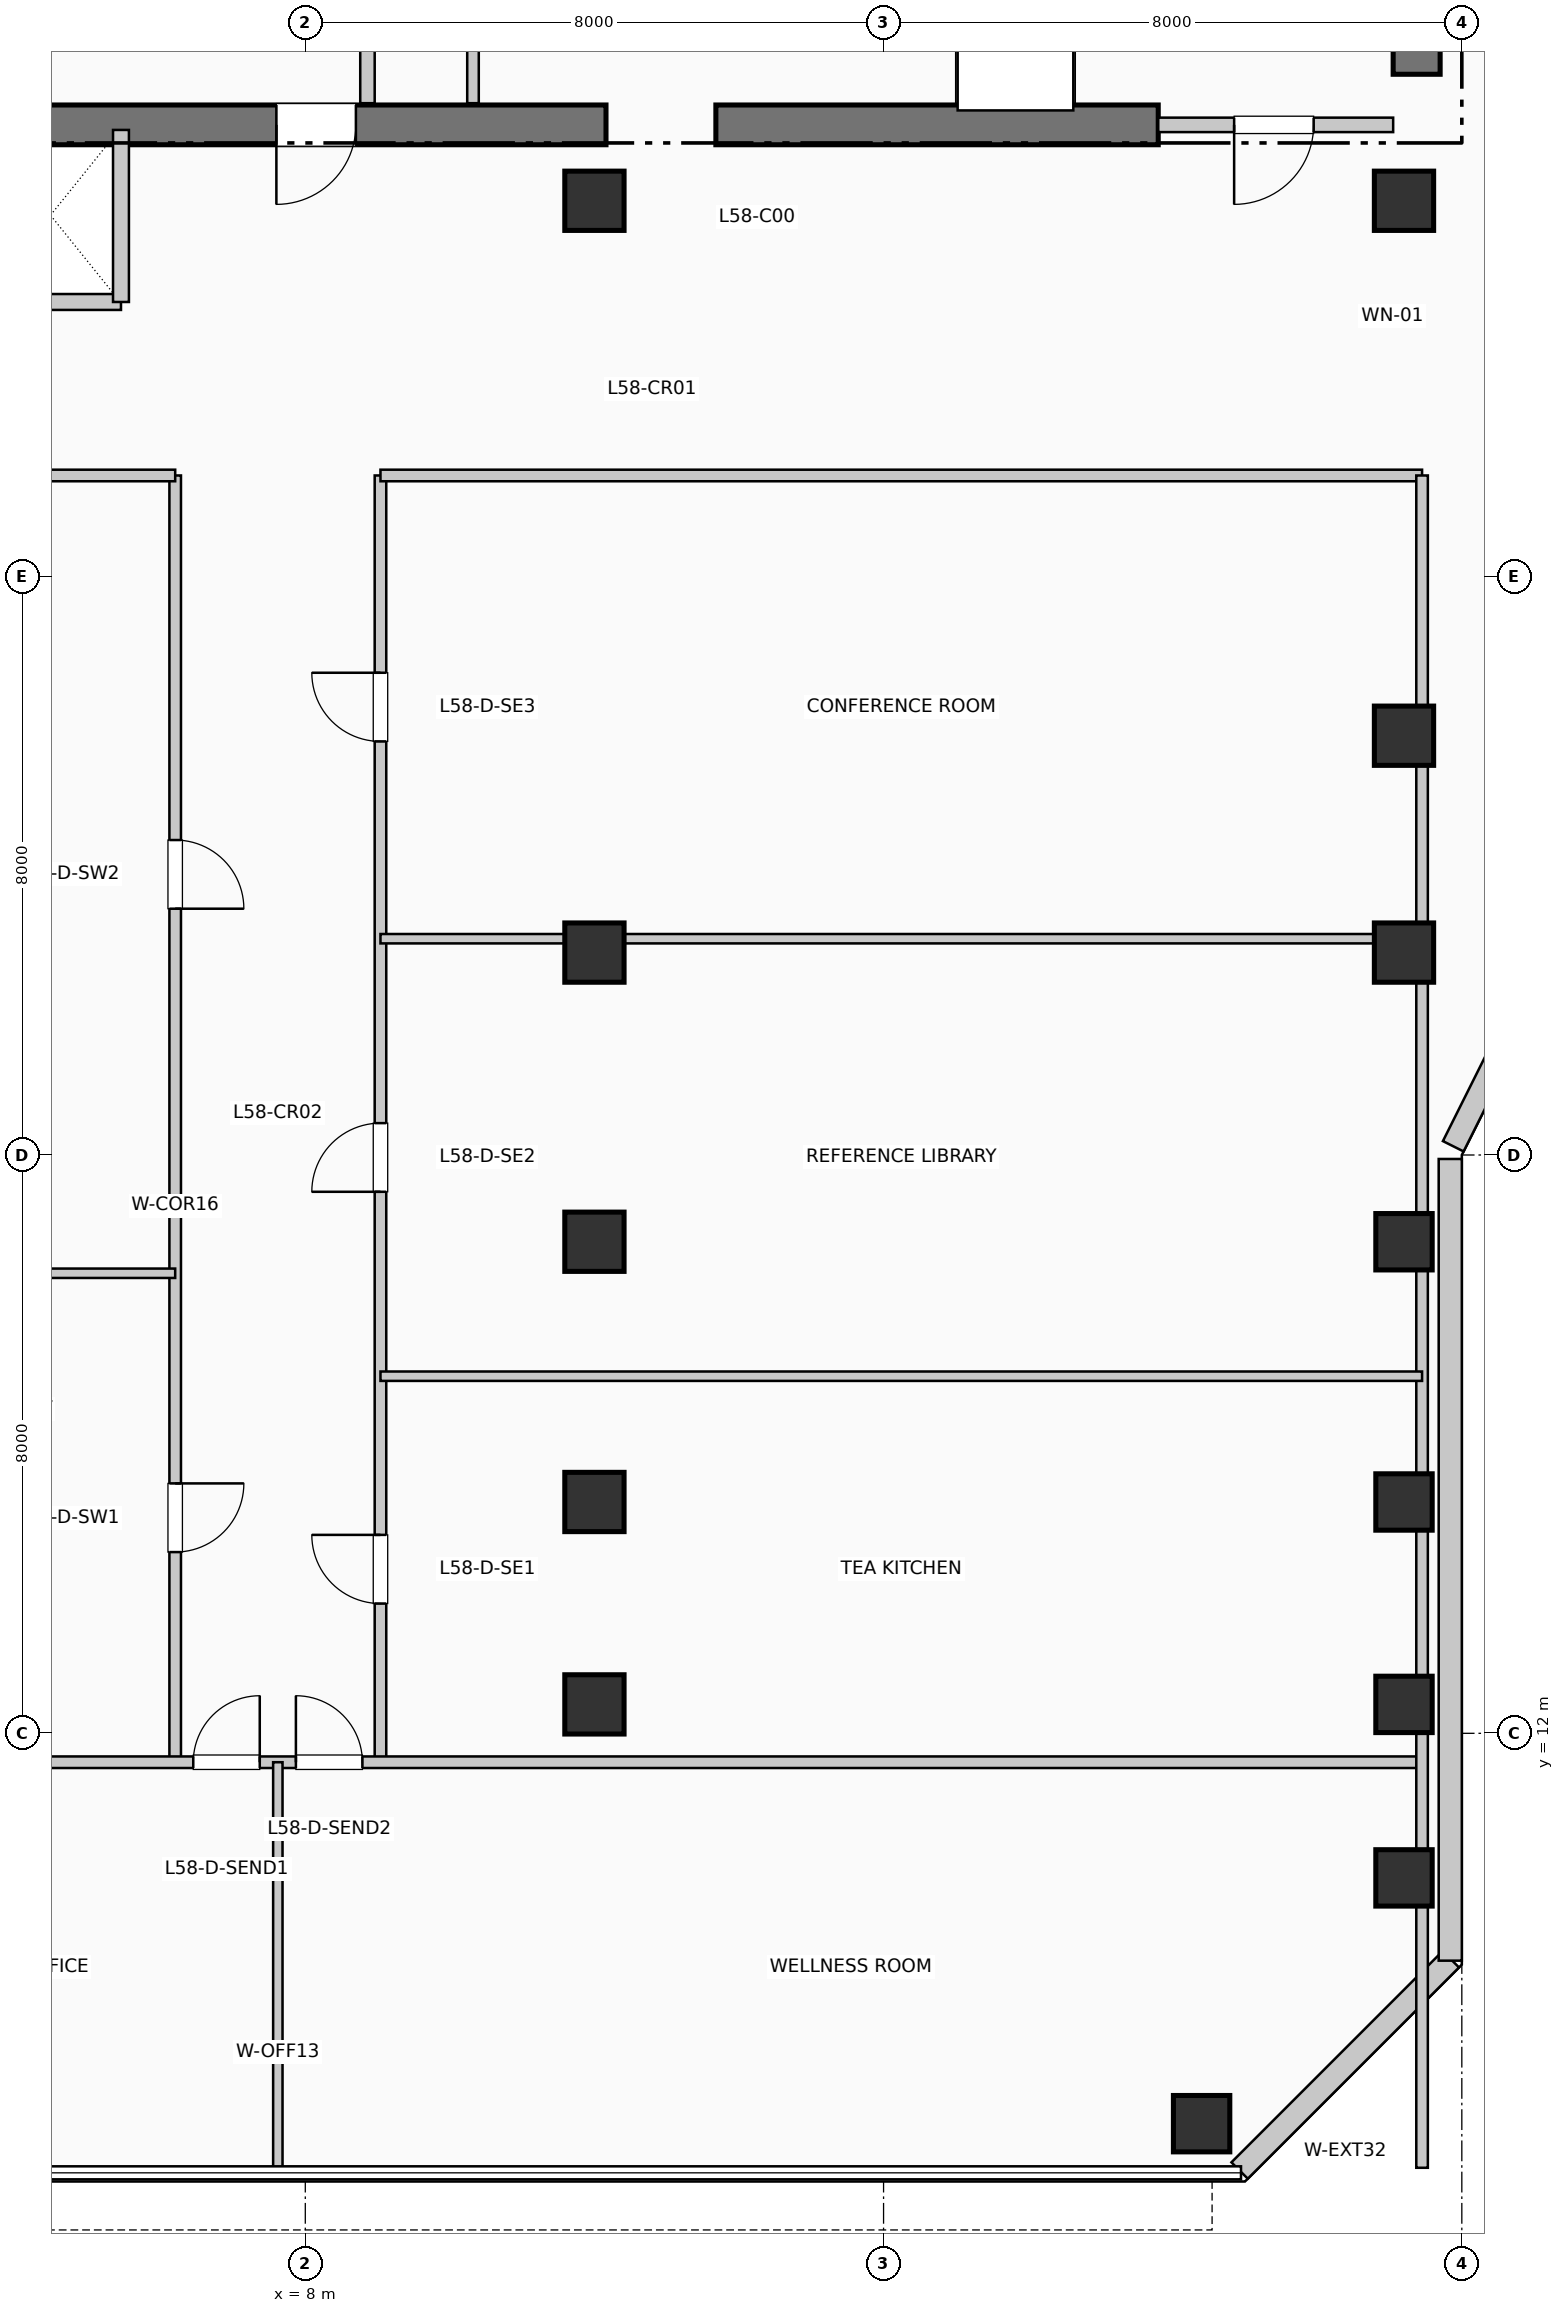
"""IFC4 building model, lengths in metres.
Left out: names, types, materials, properties, quantities, classifications, styles, units other than length and angle.
Written with IfcOpenShell. Run it as: python <this file> out.ifc"""

import sys

from ifc_helpers import new_model, si_unit, direction, frame, frame_2d, origin, origin_2d, place, context, subcontext, project, spatial, rectangle, extrude, element, fill, save


model = new_model("IFC4")
c1 = context("Model", 3, precision=1e-05, world=origin(), true_north=direction((0.0, 1.0)))
c2 = subcontext(c1, "Body", "Model", "MODEL_VIEW")
j1 = project(units=[si_unit("LENGTHUNIT", "METRE"), si_unit("PLANEANGLEUNIT", "RADIAN")], contexts=[c1])
p1 = place(None, origin())
s1 = spatial("IfcSite", under=j1, at=p1, CompositionType="ELEMENT")
p2 = place(p1, origin())
s2 = spatial("IfcBuilding", under=s1, at=p2, CompositionType="ELEMENT")
p3 = place(p2, frame((0.0, 0.0, 239.58)))
s3 = spatial("IfcBuildingStorey", under=s2, at=p3, CompositionType="ELEMENT", Elevation=239.58)
p4 = place(p3, frame((23.375, 34.95, 0.0), z_axis=(0.0, 0.0, 1.0), x_axis=(0.0, 1.0, 0.0)))
e1 = element("IfcWall", 1, at=p4, inside=s3, PredefinedType="SHEAR", context=c2, shape_type="SweptSolid", body=[
    extrude(rectangle(XDim=10.64, YDim=0.65, at=frame_2d((5.32, 0.0))), origin(), (0.0, 0.0, 1.0), 3.96),
])
p5 = place(p3, frame((1.45, 34.25, 0.0), z_axis=(0.0, 0.0, 1.0), x_axis=(1.0, 0.0, 0.0)))
e2 = element("IfcWall", 2, at=p5, inside=s3, PredefinedType="SHEAR", context=c2, shape_type="SweptSolid", body=[
    extrude(rectangle(XDim=10.71, YDim=0.55, at=frame_2d((5.355, 0.0))), origin(), (0.0, 0.0, 1.0), 3.96),
])
p6 = place(p5, frame((7.25, 0.0, 0.0), z_axis=(0.0, 0.0, 1.0), x_axis=(-1.0, 0.0, 0.0)))
e3 = element("IfcOpeningElement", 3, at=p6, cuts=e2, PredefinedType="OPENING", context=c2, shape_type="SweptSolid", body=[
    extrude(rectangle(XDim=1.1, YDim=2.15, at=frame_2d((0.55, 1.075))), frame((0.0, 0.285, 0.0), z_axis=(0.0, -1.0, 0.0), x_axis=(1.0, 0.0, 0.0)), (0.0, 0.0, 1.0), 0.57),
])
p7 = place(p3, frame((13.68, 34.25, 0.0), z_axis=(0.0, 0.0, 1.0), x_axis=(1.0, 0.0, 0.0)))
e4 = element("IfcWall", 4, at=p7, inside=s3, PredefinedType="SHEAR", context=c2, shape_type="SweptSolid", body=[
    extrude(rectangle(XDim=6.12, YDim=0.55, at=frame_2d((3.06, 0.0))), origin(), (0.0, 0.0, 1.0), 3.96),
])
for number, where, z_axis, x_axis in (
    (5, (12.0, 12.4, 0.0), (0.0, 0.0, 1.0), (1.0, 0.0, 0.0)),
    (6, (12.0, 15.2, 0.0), (0.0, 0.0, 1.0), (1.0, 0.0, 0.0)),
    (7, (12.0, 18.8, 0.0), (0.0, 0.0, 1.0), (1.0, 0.0, 0.0)),
    (8, (12.0, 22.8, 0.0), (0.0, 0.0, 1.0), (1.0, 0.0, 0.0)),
    (9, (12.0, 33.2, 0.0), (0.0, 0.0, 1.0), (1.0, 0.0, 0.0)),
):
    element("IfcColumn", number, at=place(p3, frame(where, z_axis=z_axis, x_axis=x_axis)), inside=s3, PredefinedType="COLUMN", context=c2, shape_type="SweptSolid", body=[
        extrude(rectangle(XDim=0.82, YDim=0.82, at=origin_2d()), origin(), (0.0, 0.0, 1.0), 3.96),
    ])
for number, where, z_axis, x_axis in (
    (10, (20.4, 6.6, 0.0), (0.0, 0.0, 1.0), (1.0, 0.0, 0.0)),
    (11, (23.2, 10.0, 0.0), (0.0, 0.0, 1.0), (1.0, 0.0, 0.0)),
    (12, (23.2, 12.4, 0.0), (0.0, 0.0, 1.0), (1.0, 0.0, 0.0)),
    (13, (23.2, 15.2, 0.0), (0.0, 0.0, 1.0), (1.0, 0.0, 0.0)),
    (14, (23.2, 18.8, 0.0), (0.0, 0.0, 1.0), (1.0, 0.0, 0.0)),
):
    element("IfcColumn", number, at=place(p3, frame(where, z_axis=z_axis, x_axis=x_axis)), inside=s3, PredefinedType="COLUMN", context=c2, shape_type="SweptSolid", body=[
        extrude(rectangle(XDim=0.78, YDim=0.78, at=origin_2d()), origin(), (0.0, 0.0, 1.0), 3.96),
    ])
for number, where, z_axis, x_axis in (
    (15, (23.2, 22.8, 0.0), (0.0, 0.0, 1.0), (1.0, 0.0, 0.0)),
    (16, (23.2, 25.8, 0.0), (0.0, 0.0, 1.0), (1.0, 0.0, 0.0)),
    (17, (23.2, 33.2, 0.0), (0.0, 0.0, 1.0), (1.0, 0.0, 0.0)),
):
    element("IfcColumn", number, at=place(p3, frame(where, z_axis=z_axis, x_axis=x_axis)), inside=s3, PredefinedType="COLUMN", context=c2, shape_type="SweptSolid", body=[
        extrude(rectangle(XDim=0.82, YDim=0.82, at=origin_2d()), origin(), (0.0, 0.0, 1.0), 3.96),
    ])
p8 = place(p3, frame((20.926, 5.952, 0.0), z_axis=(0.0, 0.0, 1.0), x_axis=(0.707077242712, 0.707136318428, 0.0)))
e18 = element("IfcWall", 18, at=p8, inside=s3, PredefinedType="SOLIDWALL", context=c2, shape_type="SweptSolid", body=[
    extrude(rectangle(XDim=4.133, YDim=0.32, at=frame_2d((2.066, 0.0))), origin(), (0.0, 0.0, 1.0), 3.71),
])
p9 = place(p3, frame((23.84, 8.855, 0.0), z_axis=(0.0, 0.0, 1.0), x_axis=(0.0, 1.0, 0.0)))
e19 = element("IfcWall", 19, at=p9, inside=s3, PredefinedType="SOLIDWALL", context=c2, shape_type="SweptSolid", body=[
    extrude(rectangle(XDim=11.09, YDim=0.32, at=frame_2d((5.545, 0.0))), origin(), (0.0, 0.0, 1.0), 3.71),
])
p10 = place(p3, frame((23.882, 20.121, 0.0), z_axis=(0.0, 0.0, 1.0), x_axis=(0.447121734542, 0.894473115583, 0.0)))
e20 = element("IfcWall", 20, at=p10, inside=s3, PredefinedType="SOLIDWALL", context=c2, shape_type="SweptSolid", body=[
    extrude(rectangle(XDim=2.126, YDim=0.32, at=frame_2d((1.063, 0.0))), origin(), (0.0, 0.0, 1.0), 3.71),
])
p11 = place(p3, frame((8.86, 34.55, 0.0), z_axis=(0.0, 0.0, 1.0), x_axis=(0.0, 1.0, 0.0)))
e21 = element("IfcWall", 21, at=p11, inside=s3, PredefinedType="PARTITIONING", context=c2, shape_type="SweptSolid", body=[
    extrude(rectangle(XDim=2.5, YDim=0.2, at=frame_2d((1.25, 0.0))), origin(), (0.0, 0.0, 1.0), 3.71),
])
p12 = place(p3, frame((19.8, 34.25, 0.0), z_axis=(0.0, 0.0, 1.0), x_axis=(1.0, 0.0, 0.0)))
e22 = element("IfcWall", 22, at=p12, inside=s3, PredefinedType="PARTITIONING", context=c2, shape_type="SweptSolid", body=[
    extrude(rectangle(XDim=3.25, YDim=0.2, at=frame_2d((1.625, 0.0))), origin(), (0.0, 0.0, 1.0), 3.71),
])
p13 = place(p12, frame((2.15, 0.0, 0.0), z_axis=(0.0, 0.0, 1.0), x_axis=(-1.0, 0.0, 0.0)))
e23 = element("IfcOpeningElement", 23, at=p13, cuts=e22, PredefinedType="OPENING", context=c2, shape_type="SweptSolid", body=[
    extrude(rectangle(XDim=1.1, YDim=2.15, at=frame_2d((0.55, 1.075))), frame((0.0, 0.11, 0.0), z_axis=(0.0, -1.0, 0.0), x_axis=(1.0, 0.0, 0.0)), (0.0, 0.0, 1.0), 0.22),
])
p14 = place(p3, frame((1.55, 31.8, 0.0), z_axis=(0.0, 0.0, 1.0), x_axis=(1.0, 0.0, 0.0)))
e24 = element("IfcWall", 24, at=p14, inside=s3, PredefinedType="PARTITIONING", context=c2, shape_type="SweptSolid", body=[
    extrude(rectangle(XDim=3.9, YDim=0.22, at=frame_2d((1.95, 0.0))), origin(), (0.0, 0.0, 1.0), 3.71),
])
p15 = place(p3, frame((5.45, 31.8, 0.0), z_axis=(0.0, 0.0, 1.0), x_axis=(0.0, 1.0, 0.0)))
e25 = element("IfcWall", 25, at=p15, inside=s3, PredefinedType="PARTITIONING", context=c2, shape_type="SweptSolid", body=[
    extrude(rectangle(XDim=2.38, YDim=0.22, at=frame_2d((1.19, 0.0))), origin(), (0.0, 0.0, 1.0), 3.71),
])
p16 = place(p3, frame((10.32, 34.55, 0.0), z_axis=(0.0, 0.0, 1.0), x_axis=(0.0, 1.0, 0.0)))
e26 = element("IfcWall", 26, at=p16, inside=s3, PredefinedType="PARTITIONING", context=c2, shape_type="SweptSolid", body=[
    extrude(rectangle(XDim=2.15, YDim=0.16, at=frame_2d((1.075, 0.0))), origin(), (0.0, 0.0, 1.0), 3.71),
])
p17 = place(p3, frame((6.2, 11.6, 0.0), z_axis=(0.0, 0.0, 1.0), x_axis=(0.0, 1.0, 0.0)))
e27 = element("IfcWall", 27, at=p17, inside=s3, PredefinedType="PARTITIONING", context=c2, shape_type="SweptSolid", body=[
    extrude(rectangle(XDim=17.8, YDim=0.16, at=frame_2d((8.9, 0.0))), origin(), (0.0, 0.0, 1.0), 3.71),
])
p18 = place(p17, frame((3.857, 0.0, 0.0), z_axis=(0.0, 0.0, 1.0), x_axis=(-1.0, 0.0, 0.0)))
e28 = element("IfcOpeningElement", 28, at=p18, cuts=e27, PredefinedType="OPENING", context=c2, shape_type="SweptSolid", body=[
    extrude(rectangle(XDim=0.95, YDim=2.15, at=frame_2d((0.475, 1.075))), frame((0.0, 0.09, 0.0), z_axis=(0.0, -1.0, 0.0), x_axis=(1.0, 0.0, 0.0)), (0.0, 0.0, 1.0), 0.18),
])
p19 = place(p17, frame((12.757, 0.0, 0.0), z_axis=(0.0, 0.0, 1.0), x_axis=(-1.0, 0.0, 0.0)))
e29 = element("IfcOpeningElement", 29, at=p19, cuts=e27, PredefinedType="OPENING", context=c2, shape_type="SweptSolid", body=[
    extrude(rectangle(XDim=0.95, YDim=2.15, at=frame_2d((0.475, 1.075))), frame((0.0, 0.09, 0.0), z_axis=(0.0, -1.0, 0.0), x_axis=(1.0, 0.0, 0.0)), (0.0, 0.0, 1.0), 0.18),
])
p20 = place(p3, frame((9.04, 11.6, 0.0), z_axis=(0.0, 0.0, 1.0), x_axis=(0.0, 1.0, 0.0)))
e30 = element("IfcWall", 30, at=p20, inside=s3, PredefinedType="PARTITIONING", context=c2, shape_type="SweptSolid", body=[
    extrude(rectangle(XDim=17.8, YDim=0.16, at=frame_2d((8.9, 0.0))), origin(), (0.0, 0.0, 1.0), 3.71),
])
p21 = place(p20, frame((2.195, 0.0, 0.0)))
e31 = element("IfcOpeningElement", 31, at=p21, cuts=e30, PredefinedType="OPENING", context=c2, shape_type="SweptSolid", body=[
    extrude(rectangle(XDim=0.95, YDim=2.15, at=frame_2d((0.475, 1.075))), frame((0.0, 0.09, 0.0), z_axis=(0.0, -1.0, 0.0), x_axis=(1.0, 0.0, 0.0)), (0.0, 0.0, 1.0), 0.18),
])
p22 = place(p20, frame((7.891, 0.0, 0.0)))
e32 = element("IfcOpeningElement", 32, at=p22, cuts=e30, PredefinedType="OPENING", context=c2, shape_type="SweptSolid", body=[
    extrude(rectangle(XDim=0.95, YDim=2.15, at=frame_2d((0.475, 1.075))), frame((0.0, 0.09, 0.0), z_axis=(0.0, -1.0, 0.0), x_axis=(1.0, 0.0, 0.0)), (0.0, 0.0, 1.0), 0.18),
])
p23 = place(p20, frame((14.121, 0.0, 0.0)))
e33 = element("IfcOpeningElement", 33, at=p23, cuts=e30, PredefinedType="OPENING", context=c2, shape_type="SweptSolid", body=[
    extrude(rectangle(XDim=0.95, YDim=2.15, at=frame_2d((0.475, 1.075))), frame((0.0, 0.09, 0.0), z_axis=(0.0, -1.0, 0.0), x_axis=(1.0, 0.0, 0.0)), (0.0, 0.0, 1.0), 0.18),
])
p24 = place(p3, frame((0.19, 11.6, 0.0), z_axis=(0.0, 0.0, 1.0), x_axis=(1.0, 0.0, 0.0)))
e34 = element("IfcWall", 34, at=p24, inside=s3, PredefinedType="PARTITIONING", context=c2, shape_type="SweptSolid", body=[
    extrude(rectangle(XDim=23.26, YDim=0.16, at=frame_2d((11.63, 0.0))), origin(), (0.0, 0.0, 1.0), 3.71),
])
p25 = place(p24, frame((6.26, 0.0, 0.0)))
e35 = element("IfcOpeningElement", 35, at=p25, cuts=e34, PredefinedType="OPENING", context=c2, shape_type="SweptSolid", body=[
    extrude(rectangle(XDim=0.92, YDim=2.1, at=frame_2d((0.46, 1.05))), frame((0.0, 0.09, 0.0), z_axis=(0.0, -1.0, 0.0), x_axis=(1.0, 0.0, 0.0)), (0.0, 0.0, 1.0), 0.18),
])
p26 = place(p24, frame((7.68, 0.0, 0.0)))
e36 = element("IfcOpeningElement", 36, at=p26, cuts=e34, PredefinedType="OPENING", context=c2, shape_type="SweptSolid", body=[
    extrude(rectangle(XDim=0.92, YDim=2.1, at=frame_2d((0.46, 1.05))), frame((0.0, 0.09, 0.0), z_axis=(0.0, -1.0, 0.0), x_axis=(1.0, 0.0, 0.0)), (0.0, 0.0, 1.0), 0.18),
])
p27 = place(p3, frame((0.19, 29.4, 0.0), z_axis=(0.0, 0.0, 1.0), x_axis=(1.0, 0.0, 0.0)))
e37 = element("IfcWall", 37, at=p27, inside=s3, PredefinedType="PARTITIONING", context=c2, shape_type="SweptSolid", body=[
    extrude(rectangle(XDim=6.01, YDim=0.16, at=frame_2d((3.005, 0.0))), origin(), (0.0, 0.0, 1.0), 3.365),
])
p28 = place(p3, frame((9.04, 29.4, 0.0), z_axis=(0.0, 0.0, 1.0), x_axis=(1.0, 0.0, 0.0)))
e38 = element("IfcWall", 38, at=p28, inside=s3, PredefinedType="PARTITIONING", context=c2, shape_type="SweptSolid", body=[
    extrude(rectangle(XDim=14.41, YDim=0.16, at=frame_2d((7.205, 0.0))), origin(), (0.0, 0.0, 1.0), 3.365),
])
p29 = place(p3, frame((23.45, 5.99, 0.0), z_axis=(0.0, 0.0, 1.0), x_axis=(0.0, 1.0, 0.0)))
e39 = element("IfcWall", 39, at=p29, inside=s3, PredefinedType="PARTITIONING", context=c2, shape_type="SweptSolid", body=[
    extrude(rectangle(XDim=23.41, YDim=0.16, at=frame_2d((11.705, 0.0))), origin(), (0.0, 0.0, 1.0), 3.095),
])
p30 = place(p3, frame((7.62, 5.99, 0.0), z_axis=(0.0, 0.0, 1.0), x_axis=(0.0, 1.0, 0.0)))
e40 = element("IfcWall", 40, at=p30, inside=s3, PredefinedType="PARTITIONING", context=c2, shape_type="SweptSolid", body=[
    extrude(rectangle(XDim=5.61, YDim=0.13, at=frame_2d((2.805, 0.0))), origin(), (0.0, 0.0, 1.0), 3.71),
])
p31 = place(p3, frame((0.19, 18.364, 0.0), z_axis=(0.0, 0.0, 1.0), x_axis=(1.0, 0.0, 0.0)))
e41 = element("IfcWall", 41, at=p31, inside=s3, PredefinedType="PARTITIONING", context=c2, shape_type="SweptSolid", body=[
    extrude(rectangle(XDim=6.01, YDim=0.13, at=frame_2d((3.005, 0.0))), origin(), (0.0, 0.0, 1.0), 3.095),
])
p32 = place(p3, frame((9.04, 16.94, 0.0), z_axis=(0.0, 0.0, 1.0), x_axis=(1.0, 0.0, 0.0)))
e42 = element("IfcWall", 42, at=p32, inside=s3, PredefinedType="PARTITIONING", context=c2, shape_type="SweptSolid", body=[
    extrude(rectangle(XDim=14.41, YDim=0.13, at=frame_2d((7.205, 0.0))), origin(), (0.0, 0.0, 1.0), 3.71),
])
p33 = place(p3, frame((9.04, 22.992, 0.0), z_axis=(0.0, 0.0, 1.0), x_axis=(1.0, 0.0, 0.0)))
e43 = element("IfcWall", 43, at=p33, inside=s3, PredefinedType="PARTITIONING", context=c2, shape_type="SweptSolid", body=[
    extrude(rectangle(XDim=14.41, YDim=0.13, at=frame_2d((7.205, 0.0))), origin(), (0.0, 0.0, 1.0), 3.095),
])
p34 = place(p6, origin())
e44 = element("IfcDoor", 44, at=p34, inside=s3, OperationType="SINGLE_SWING_LEFT", PredefinedType="DOOR", context=c2, shape_type="SweptSolid", body=[
    extrude(rectangle(XDim=1.1, YDim=2.15, at=frame_2d((0.55, 1.075))), frame((0.0, 0.025, 0.0), z_axis=(0.0, -1.0, 0.0), x_axis=(1.0, 0.0, 0.0)), (0.0, 0.0, 1.0), 0.05),
])
fill(e3, e44)
p35 = place(p13, origin())
e45 = element("IfcDoor", 45, at=p35, inside=s3, OperationType="SINGLE_SWING_LEFT", PredefinedType="DOOR", context=c2, shape_type="SweptSolid", body=[
    extrude(rectangle(XDim=1.1, YDim=2.15, at=frame_2d((0.55, 1.075))), frame((0.0, 0.025, 0.0), z_axis=(0.0, -1.0, 0.0), x_axis=(1.0, 0.0, 0.0)), (0.0, 0.0, 1.0), 0.05),
])
fill(e23, e45)
p36 = place(p25, origin())
e46 = element("IfcDoor", 46, at=p36, inside=s3, OperationType="SINGLE_SWING_RIGHT", PredefinedType="DOOR", context=c2, shape_type="SweptSolid", body=[
    extrude(rectangle(XDim=0.92, YDim=2.1, at=frame_2d((0.46, 1.05))), frame((0.0, 0.025, 0.0), z_axis=(0.0, -1.0, 0.0), x_axis=(1.0, 0.0, 0.0)), (0.0, 0.0, 1.0), 0.05),
])
fill(e35, e46)
p37 = place(p26, origin())
e47 = element("IfcDoor", 47, at=p37, inside=s3, OperationType="SINGLE_SWING_LEFT", PredefinedType="DOOR", context=c2, shape_type="SweptSolid", body=[
    extrude(rectangle(XDim=0.92, YDim=2.1, at=frame_2d((0.46, 1.05))), frame((0.0, 0.025, 0.0), z_axis=(0.0, -1.0, 0.0), x_axis=(1.0, 0.0, 0.0)), (0.0, 0.0, 1.0), 0.05),
])
fill(e36, e47)
p38 = place(p18, origin())
e48 = element("IfcDoor", 48, at=p38, inside=s3, OperationType="SINGLE_SWING_RIGHT", PredefinedType="DOOR", context=c2, shape_type="SweptSolid", body=[
    extrude(rectangle(XDim=0.95, YDim=2.15, at=frame_2d((0.475, 1.075))), frame((0.0, 0.025, 0.0), z_axis=(0.0, -1.0, 0.0), x_axis=(1.0, 0.0, 0.0)), (0.0, 0.0, 1.0), 0.05),
])
fill(e28, e48)
p39 = place(p19, origin())
e49 = element("IfcDoor", 49, at=p39, inside=s3, OperationType="SINGLE_SWING_LEFT", PredefinedType="DOOR", context=c2, shape_type="SweptSolid", body=[
    extrude(rectangle(XDim=0.95, YDim=2.15, at=frame_2d((0.475, 1.075))), frame((0.0, 0.025, 0.0), z_axis=(0.0, -1.0, 0.0), x_axis=(1.0, 0.0, 0.0)), (0.0, 0.0, 1.0), 0.05),
])
fill(e29, e49)
p40 = place(p21, origin())
e50 = element("IfcDoor", 50, at=p40, inside=s3, OperationType="SINGLE_SWING_RIGHT", PredefinedType="DOOR", context=c2, shape_type="SweptSolid", body=[
    extrude(rectangle(XDim=0.95, YDim=2.15, at=frame_2d((0.475, 1.075))), frame((0.0, 0.025, 0.0), z_axis=(0.0, -1.0, 0.0), x_axis=(1.0, 0.0, 0.0)), (0.0, 0.0, 1.0), 0.05),
])
fill(e31, e50)
p41 = place(p22, origin())
e51 = element("IfcDoor", 51, at=p41, inside=s3, OperationType="SINGLE_SWING_LEFT", PredefinedType="DOOR", context=c2, shape_type="SweptSolid", body=[
    extrude(rectangle(XDim=0.95, YDim=2.15, at=frame_2d((0.475, 1.075))), frame((0.0, 0.025, 0.0), z_axis=(0.0, -1.0, 0.0), x_axis=(1.0, 0.0, 0.0)), (0.0, 0.0, 1.0), 0.05),
])
fill(e32, e51)
p42 = place(p23, origin())
e52 = element("IfcDoor", 52, at=p42, inside=s3, OperationType="SINGLE_SWING_RIGHT", PredefinedType="DOOR", context=c2, shape_type="SweptSolid", body=[
    extrude(rectangle(XDim=0.95, YDim=2.15, at=frame_2d((0.475, 1.075))), frame((0.0, 0.025, 0.0), z_axis=(0.0, -1.0, 0.0), x_axis=(1.0, 0.0, 0.0)), (0.0, 0.0, 1.0), 0.05),
])
fill(e33, e52)
save(model, sys.argv[1])
